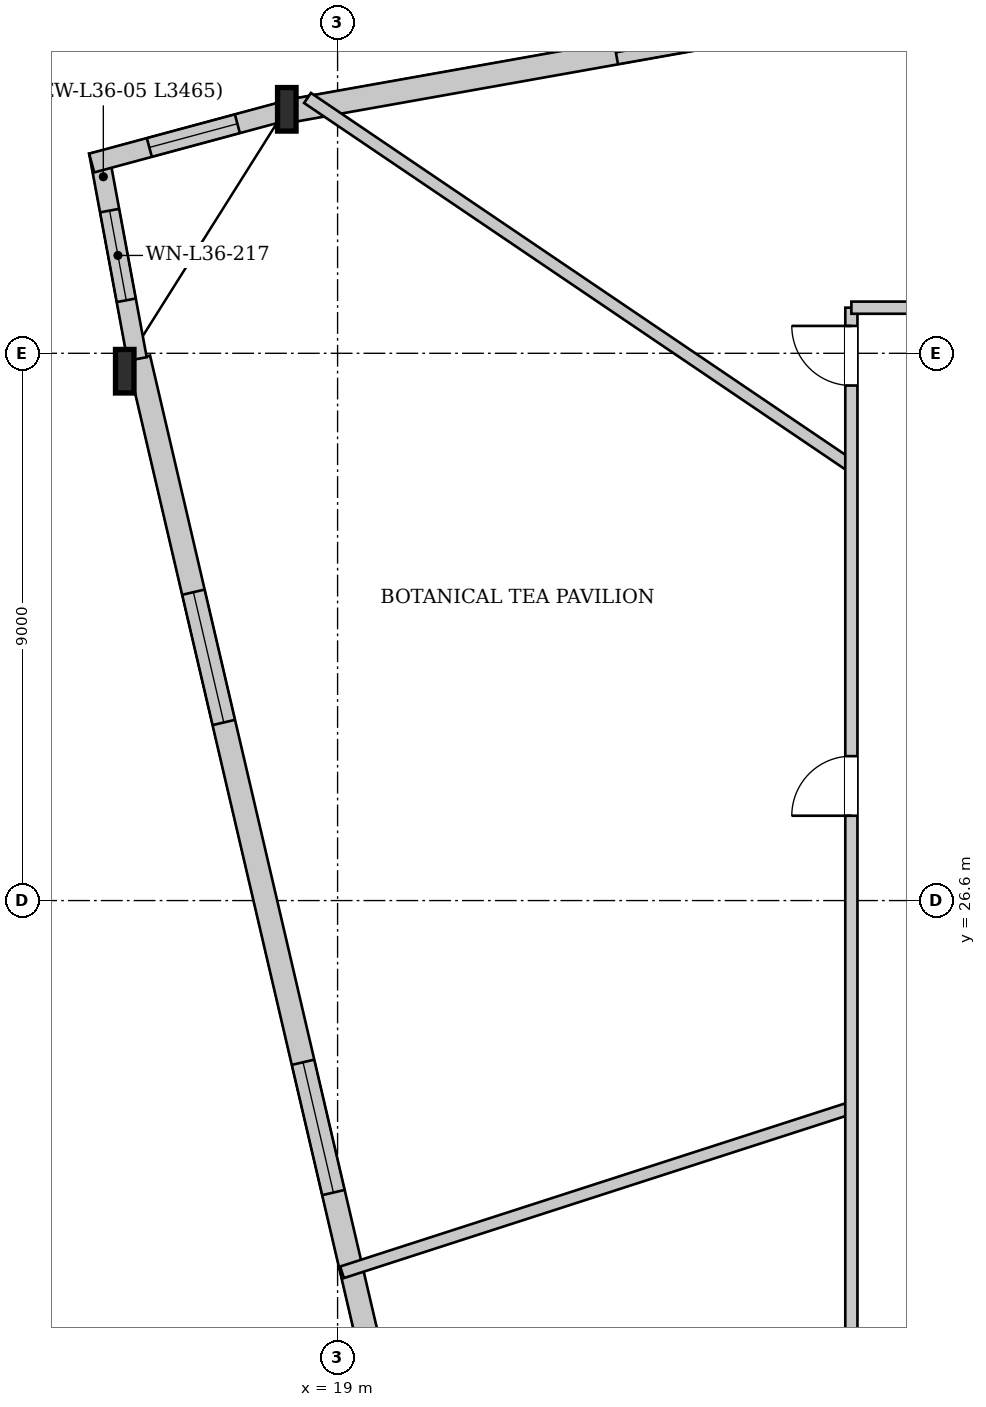
"""IFC4 building model, lengths in metres.
Left out: names, types, materials, properties, quantities, classifications, styles, units other than length and angle.
Written with IfcOpenShell. Run it as: python <this file> out.ifc"""

import sys

from ifc_helpers import new_model, si_unit, direction, frame, frame_2d, origin, origin_2d, place, context, subcontext, project, spatial, rectangle, i_section, extrude, source, transform, mapped, element, fill, save


model = new_model("IFC4")
c1 = context("Model", 3, precision=1e-05, world=origin(), true_north=direction((0.0, 1.0)))
c2 = subcontext(c1, "Body", "Model", "MODEL_VIEW")
j1 = project(units=[si_unit("LENGTHUNIT", "METRE"), si_unit("PLANEANGLEUNIT", "RADIAN")], contexts=[c1])
p1 = place(None, origin())
s1 = spatial("IfcSite", under=j1, at=p1, CompositionType="ELEMENT")
p2 = place(p1, origin())
s2 = spatial("IfcBuilding", under=s1, at=p2, CompositionType="ELEMENT")
p3 = place(p2, frame((0.0, 0.0, 138.1)))
s3 = spatial("IfcBuildingStorey", under=s2, at=p3, CompositionType="ELEMENT", Elevation=138.1)
m1 = source(origin(), c2, "Body", "SweptSolid", [
    extrude(i_section(OverallWidth=0.304, OverallDepth=0.716, WebThickness=0.021, FlangeThickness=0.04, at=origin_2d()), origin(), (0.0, 0.0, 1.0), 3.855),
])
p4 = place(p3, frame((18.259, 39.786, 0.0), z_axis=(-0.048951982547, -0.089924728611, 0.994744814809), x_axis=(0.878297104228, -0.478115254625, 0.0)))
e1 = element("IfcColumn", 1, at=p4, inside=s3, PredefinedType="COLUMN", context=c2, shape_type="MappedRepresentation", body=[
    mapped(m1, transform((0.0, 0.0, 0.0), x_axis=(1.0, 0.0, 0.0), y_axis=(0.0, 1.0, 0.0), z_axis=(0.0, 0.0, 1.0), scale=1.0)),
])
m2 = source(origin(), c2, "Body", "SweptSolid", [
    extrude(i_section(OverallWidth=0.304, OverallDepth=0.716, WebThickness=0.021, FlangeThickness=0.04, at=origin_2d()), origin(), (0.0, 0.0, 1.0), 3.851),
])
p5 = place(p3, frame((15.546, 35.477, 0.0), z_axis=(-0.024151389797, -0.089188990666, 0.995721865942), x_axis=(0.965237189927, -0.261375529042, 0.0)))
e2 = element("IfcColumn", 2, at=p5, inside=s3, PredefinedType="COLUMN", context=c2, shape_type="MappedRepresentation", body=[
    mapped(m2, transform((0.0, 0.0, 0.0), x_axis=(1.0, 0.0, 0.0), y_axis=(0.0, 1.0, 0.0), z_axis=(0.0, 0.0, 1.0), scale=1.0)),
])
p6 = place(p3, frame((19.829, 17.95, 0.0), z_axis=(0.0, 0.0, 1.0), x_axis=(-0.22713293769, 0.973863762862, 0.0)))
e3 = element("IfcWall", 3, at=p6, inside=s3, PredefinedType="SOLIDWALL", context=c2, shape_type="SweptSolid", body=[
    extrude(rectangle(XDim=18.042, YDim=0.38, at=frame_2d((9.021, 0.0))), origin(), (0.0, 0.0, 1.0), 2.972),
])
p7 = place(p6, frame((3.952, 0.0, 0.602)))
e4 = element("IfcOpeningElement", 4, at=p7, cuts=e3, PredefinedType="OPENING", context=c2, shape_type="SweptSolid", body=[
    extrude(rectangle(XDim=2.2, YDim=2.25, at=frame_2d((1.1, 1.125))), frame((0.0, 0.2, 0.0), z_axis=(0.0, -1.0, 0.0), x_axis=(1.0, 0.0, 0.0)), (0.0, 0.0, 1.0), 0.4),
])
p8 = place(p6, frame((11.89, 0.0, 0.602)))
e5 = element("IfcOpeningElement", 5, at=p8, cuts=e3, PredefinedType="OPENING", context=c2, shape_type="SweptSolid", body=[
    extrude(rectangle(XDim=2.2, YDim=2.25, at=frame_2d((1.1, 1.125))), frame((0.0, 0.2, 0.0), z_axis=(0.0, -1.0, 0.0), x_axis=(1.0, 0.0, 0.0)), (0.0, 0.0, 1.0), 0.4),
])
p9 = place(p3, frame((15.703, 35.506, 0.0), z_axis=(0.0, 0.0, 1.0), x_axis=(-0.182437468588, 0.983217458173, 0.0)))
e6 = element("IfcWall", 6, at=p9, inside=s3, PredefinedType="SOLIDWALL", context=c2, shape_type="SweptSolid", body=[
    extrude(rectangle(XDim=3.465, YDim=0.32, at=frame_2d((1.732, 0.0))), origin(), (0.0, 0.0, 1.0), 2.972),
])
p10 = place(p9, frame((0.982, 0.0, 0.552)))
e7 = element("IfcOpeningElement", 7, at=p10, cuts=e6, PredefinedType="OPENING", context=c2, shape_type="SweptSolid", body=[
    extrude(rectangle(XDim=1.5, YDim=2.3, at=frame_2d((0.75, 1.15))), frame((0.0, 0.17, 0.0), z_axis=(0.0, -1.0, 0.0), x_axis=(1.0, 0.0, 0.0)), (0.0, 0.0, 1.0), 0.34),
])
p11 = place(p3, frame((14.956, 38.729, 0.0), z_axis=(0.0, 0.0, 1.0), x_axis=(0.965504765996, 0.260385381385, 0.0)))
e8 = element("IfcWall", 8, at=p11, inside=s3, PredefinedType="SOLIDWALL", context=c2, shape_type="SweptSolid", body=[
    extrude(rectangle(XDim=3.465, YDim=0.32, at=frame_2d((1.732, 0.0))), origin(), (0.0, 0.0, 1.0), 2.972),
])
p12 = place(p11, frame((0.982, 0.0, 0.552)))
e9 = element("IfcOpeningElement", 9, at=p12, cuts=e8, PredefinedType="OPENING", context=c2, shape_type="SweptSolid", body=[
    extrude(rectangle(XDim=1.5, YDim=2.3, at=frame_2d((0.75, 1.15))), frame((0.0, 0.17, 0.0), z_axis=(0.0, -1.0, 0.0), x_axis=(1.0, 0.0, 0.0)), (0.0, 0.0, 1.0), 0.34),
])
p13 = place(p3, frame((18.292, 39.598, 0.0), z_axis=(0.0, 0.0, 1.0), x_axis=(0.98454939434, 0.175107081823, 0.0)))
e10 = element("IfcWall", 10, at=p13, inside=s3, PredefinedType="SOLIDWALL", context=c2, shape_type="SweptSolid", body=[
    extrude(rectangle(XDim=23.105, YDim=0.38, at=frame_2d((11.553, 0.0))), origin(), (0.0, 0.0, 1.0), 2.972),
])
p14 = place(p13, frame((5.369, 0.0, 0.602)))
e11 = element("IfcOpeningElement", 11, at=p14, cuts=e10, PredefinedType="OPENING", context=c2, shape_type="SweptSolid", body=[
    extrude(rectangle(XDim=2.2, YDim=2.25, at=frame_2d((1.1, 1.125))), frame((0.0, 0.2, 0.0), z_axis=(0.0, -1.0, 0.0), x_axis=(1.0, 0.0, 0.0)), (0.0, 0.0, 1.0), 0.4),
])
p15 = place(p13, frame((15.536, 0.0, 0.602)))
e12 = element("IfcOpeningElement", 12, at=p15, cuts=e10, PredefinedType="OPENING", context=c2, shape_type="SweptSolid", body=[
    extrude(rectangle(XDim=2.2, YDim=2.25, at=frame_2d((1.1, 1.125))), frame((0.0, 0.2, 0.0), z_axis=(0.0, -1.0, 0.0), x_axis=(1.0, 0.0, 0.0)), (0.0, 0.0, 1.0), 0.4),
])
p16 = place(p3, frame((27.45, 33.743, 0.0), z_axis=(0.0, 0.0, 1.0), x_axis=(-0.828061528822, 0.560637230734, 0.0)))
e13 = element("IfcWall", 13, at=p16, inside=s3, PredefinedType="PARTITIONING", context=c2, shape_type="SweptSolid", body=[
    extrude(rectangle(XDim=10.802, YDim=0.2, at=frame_2d((5.401, 0.0))), origin(), (0.0, 0.0, 1.0), 3.075),
])
p17 = place(p3, frame((27.45, 23.192, 0.0), z_axis=(0.0, 0.0, 1.0), x_axis=(-0.951598248923, -0.307344713061, 0.0)))
e14 = element("IfcWall", 14, at=p17, inside=s3, PredefinedType="PARTITIONING", context=c2, shape_type="SweptSolid", body=[
    extrude(rectangle(XDim=8.803, YDim=0.2, at=frame_2d((4.401, 0.0))), origin(), (0.0, 0.0, 1.0), 3.58),
])
p18 = place(p3, frame((27.45, 16.85, 0.0), z_axis=(0.0, 0.0, 1.0), x_axis=(0.0, 1.0, 0.0)))
e15 = element("IfcWall", 15, at=p18, inside=s3, PredefinedType="PARTITIONING", context=c2, shape_type="SweptSolid", body=[
    extrude(rectangle(XDim=19.5, YDim=0.2, at=frame_2d((9.75, 0.0))), origin(), (0.0, 0.0, 1.0), 3.58),
])
p19 = place(p18, frame((18.22, 0.0, 0.0)))
e16 = element("IfcOpeningElement", 16, at=p19, cuts=e15, PredefinedType="OPENING", context=c2, shape_type="SweptSolid", body=[
    extrude(rectangle(XDim=0.98, YDim=2.15, at=frame_2d((0.49, 1.075))), frame((0.0, 0.11, 0.0), z_axis=(0.0, -1.0, 0.0), x_axis=(1.0, 0.0, 0.0)), (0.0, 0.0, 1.0), 0.22),
])
p20 = place(p18, frame((11.145, 0.0, 0.0)))
e17 = element("IfcOpeningElement", 17, at=p20, cuts=e15, PredefinedType="OPENING", context=c2, shape_type="SweptSolid", body=[
    extrude(rectangle(XDim=0.98, YDim=2.15, at=frame_2d((0.49, 1.075))), frame((0.0, 0.11, 0.0), z_axis=(0.0, -1.0, 0.0), x_axis=(1.0, 0.0, 0.0)), (0.0, 0.0, 1.0), 0.22),
])
p21 = place(p3, frame((27.45, 36.35, 0.0), z_axis=(0.0, 0.0, 1.0), x_axis=(1.0, 0.0, 0.0)))
e18 = element("IfcWall", 18, at=p21, inside=s3, PredefinedType="PARTITIONING", context=c2, shape_type="SweptSolid", body=[
    extrude(rectangle(XDim=21.1, YDim=0.2, at=frame_2d((10.55, 0.0))), origin(), (0.0, 0.0, 1.0), 3.58),
])
p22 = place(p21, frame((19.2, 0.0, 0.0)))
e19 = element("IfcOpeningElement", 19, at=p22, cuts=e18, PredefinedType="OPENING", context=c2, shape_type="SweptSolid", body=[
    extrude(rectangle(XDim=1.6, YDim=2.2, at=frame_2d((0.8, 1.1))), frame((0.0, 0.11, 0.0), z_axis=(0.0, -1.0, 0.0), x_axis=(1.0, 0.0, 0.0)), (0.0, 0.0, 1.0), 0.22),
])
m3 = source(origin(), c2, "Body", "SweptSolid", [
    extrude(rectangle(XDim=2.2, YDim=2.25, at=frame_2d((1.1, 1.125))), frame((0.0, 0.03, 0.0), z_axis=(0.0, -1.0, 0.0), x_axis=(1.0, 0.0, 0.0)), (0.0, 0.0, 1.0), 0.06),
])
p23 = place(p7, origin())
e20 = element("IfcWindow", 20, at=p23, inside=s3, PartitioningType="SINGLE_PANEL", PredefinedType="WINDOW", context=c2, shape_type="MappedRepresentation", body=[
    mapped(m3, transform((0.0, 0.0, 0.0), x_axis=(1.0, 0.0, 0.0), y_axis=(0.0, 1.0, 0.0), z_axis=(0.0, 0.0, 1.0), scale=1.0)),
])
fill(e4, e20)
p24 = place(p8, origin())
e21 = element("IfcWindow", 21, at=p24, inside=s3, PartitioningType="SINGLE_PANEL", PredefinedType="WINDOW", context=c2, shape_type="MappedRepresentation", body=[
    mapped(m3, transform((0.0, 0.0, 0.0), x_axis=(1.0, 0.0, 0.0), y_axis=(0.0, 1.0, 0.0), z_axis=(0.0, 0.0, 1.0), scale=1.0)),
])
fill(e5, e21)
m4 = source(origin(), c2, "Body", "SweptSolid", [
    extrude(rectangle(XDim=1.5, YDim=2.3, at=frame_2d((0.75, 1.15))), frame((0.0, 0.03, 0.0), z_axis=(0.0, -1.0, 0.0), x_axis=(1.0, 0.0, 0.0)), (0.0, 0.0, 1.0), 0.06),
])
p25 = place(p10, origin())
e22 = element("IfcWindow", 22, at=p25, inside=s3, PartitioningType="SINGLE_PANEL", PredefinedType="WINDOW", context=c2, shape_type="MappedRepresentation", body=[
    mapped(m4, transform((0.0, 0.0, 0.0), x_axis=(1.0, 0.0, 0.0), y_axis=(0.0, 1.0, 0.0), z_axis=(0.0, 0.0, 1.0), scale=1.0)),
])
fill(e7, e22)
p26 = place(p12, origin())
e23 = element("IfcWindow", 23, at=p26, inside=s3, PartitioningType="SINGLE_PANEL", PredefinedType="WINDOW", context=c2, shape_type="MappedRepresentation", body=[
    mapped(m4, transform((0.0, 0.0, 0.0), x_axis=(1.0, 0.0, 0.0), y_axis=(0.0, 1.0, 0.0), z_axis=(0.0, 0.0, 1.0), scale=1.0)),
])
fill(e9, e23)
p27 = place(p14, origin())
e24 = element("IfcWindow", 24, at=p27, inside=s3, PartitioningType="SINGLE_PANEL", PredefinedType="WINDOW", context=c2, shape_type="MappedRepresentation", body=[
    mapped(m3, transform((0.0, 0.0, 0.0), x_axis=(1.0, 0.0, 0.0), y_axis=(0.0, 1.0, 0.0), z_axis=(0.0, 0.0, 1.0), scale=1.0)),
])
fill(e11, e24)
m5 = source(origin(), c2, "Body", "SweptSolid", [
    extrude(rectangle(XDim=0.98, YDim=2.15, at=frame_2d((0.49, 1.075))), frame((0.0, 0.025, 0.0), z_axis=(0.0, -1.0, 0.0), x_axis=(1.0, 0.0, 0.0)), (0.0, 0.0, 1.0), 0.05),
])
p28 = place(p19, origin())
e25 = element("IfcDoor", 25, at=p28, inside=s3, OperationType="SINGLE_SWING_RIGHT", PredefinedType="DOOR", context=c2, shape_type="MappedRepresentation", body=[
    mapped(m5, transform((0.0, 0.0, 0.0), x_axis=(1.0, 0.0, 0.0), y_axis=(0.0, 1.0, 0.0), z_axis=(0.0, 0.0, 1.0), scale=1.0)),
])
fill(e16, e25)
p29 = place(p20, origin())
e26 = element("IfcDoor", 26, at=p29, inside=s3, OperationType="SINGLE_SWING_LEFT", PredefinedType="DOOR", context=c2, shape_type="MappedRepresentation", body=[
    mapped(m5, transform((0.0, 0.0, 0.0), x_axis=(1.0, 0.0, 0.0), y_axis=(0.0, 1.0, 0.0), z_axis=(0.0, 0.0, 1.0), scale=1.0)),
])
fill(e17, e26)
save(model, sys.argv[1])
